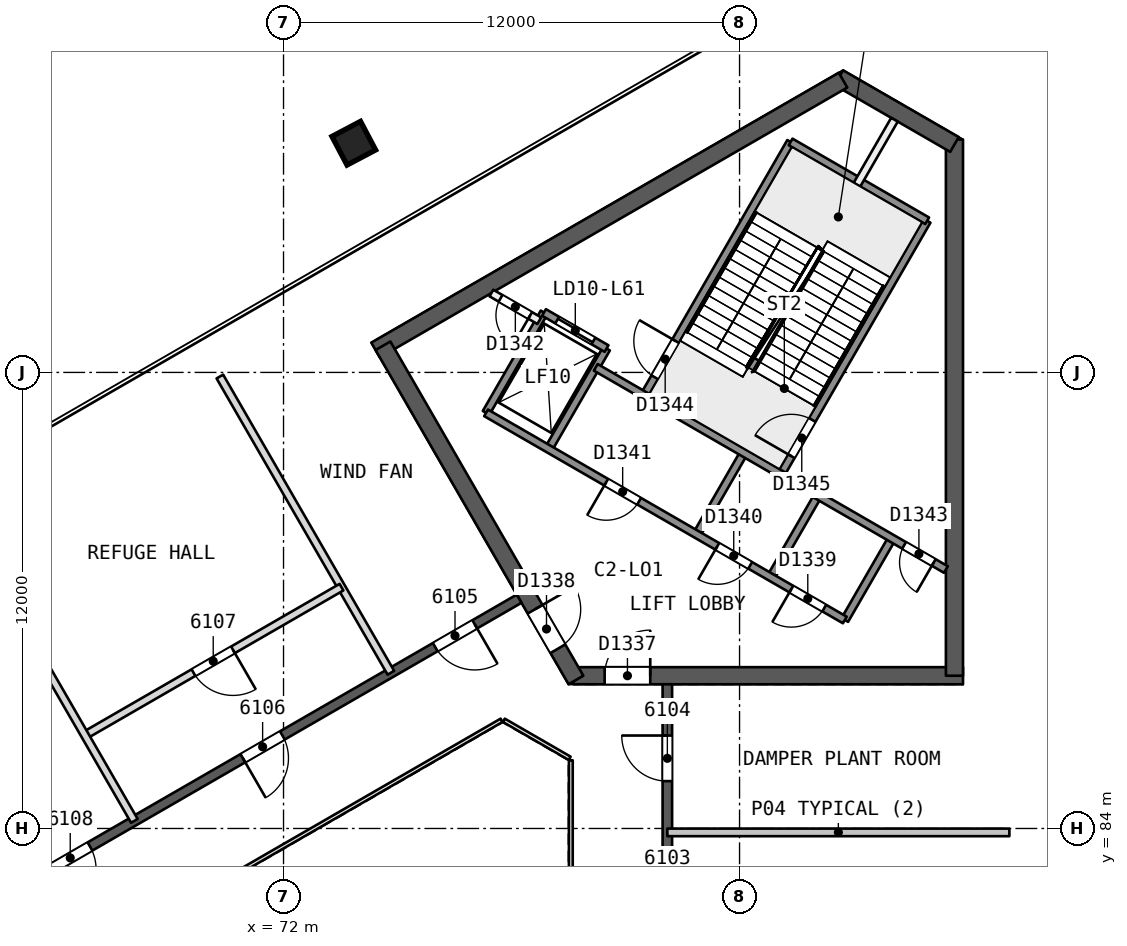
"""IFC4 building model, lengths in metres.
Left out: names, types, materials, properties, quantities, classifications, styles, units other than length and angle.
Written with IfcOpenShell. Run it as: python <this file> out.ifc"""

import sys

from ifc_helpers import new_model, si_unit, direction, frame, frame_2d, origin, origin_2d, place, context, subcontext, project, spatial, rectangle, extrude, element, fill, save


model = new_model("IFC4")
c1 = context("Model", 3, precision=1e-05, world=origin(), true_north=direction((0.0, 1.0)))
c2 = subcontext(c1, "Body", "Model", "MODEL_VIEW")
j1 = project(units=[si_unit("LENGTHUNIT", "METRE"), si_unit("PLANEANGLEUNIT", "RADIAN")], contexts=[c1])
p1 = place(None, origin())
s1 = spatial("IfcSite", under=j1, at=p1, CompositionType="ELEMENT")
p2 = place(p1, origin())
s2 = spatial("IfcBuilding", under=s1, at=p2, CompositionType="ELEMENT")
p3 = place(p2, frame((0.0, 0.0, 246.5)))
s3 = spatial("IfcBuildingStorey", under=s2, at=p3, CompositionType="ELEMENT", Elevation=246.5)
p4 = place(p3, frame((65.74, 80.0, 0.0), z_axis=(0.0, 0.0, 1.0), x_axis=(-0.499991857942, 0.866030104553, 0.0)))
e1 = element("IfcWall", 1, at=p4, inside=s3, PredefinedType="SHEAR", context=c2, shape_type="SweptSolid", body=[
    extrude(rectangle(XDim=10.25, YDim=0.45, at=frame_2d((5.125, 0.0))), origin(), (0.0, 0.0, 1.0), 8.8),
])
p5 = place(p4, frame((0.82, 0.0, 0.0)))
e2 = element("IfcOpeningElement", 2, at=p5, cuts=e1, PredefinedType="OPENING", context=c2, shape_type="SweptSolid", body=[
    extrude(rectangle(XDim=1.2, YDim=2.1, at=frame_2d((0.6, 1.05))), frame((0.0, 0.235, 0.0), z_axis=(0.0, -1.0, 0.0), x_axis=(1.0, 0.0, 0.0)), (0.0, 0.0, 1.0), 0.471),
])
p6 = place(p3, frame((79.63, 88.019, 0.0), z_axis=(0.0, 0.0, 1.0), x_axis=(1.0, 0.0, 0.0)))
e3 = element("IfcWall", 3, at=p6, inside=s3, PredefinedType="SHEAR", context=c2, shape_type="SweptSolid", body=[
    extrude(rectangle(XDim=10.25, YDim=0.45, at=frame_2d((5.125, 0.0))), origin(), (0.0, 0.0, 1.0), 8.8),
])
p7 = place(p6, frame((0.82, 0.0, 0.0)))
e4 = element("IfcOpeningElement", 4, at=p7, cuts=e3, PredefinedType="OPENING", context=c2, shape_type="SweptSolid", body=[
    extrude(rectangle(XDim=1.2, YDim=2.1, at=frame_2d((0.6, 1.05))), frame((0.0, 0.235, 0.0), z_axis=(0.0, -1.0, 0.0), x_axis=(1.0, 0.0, 0.0)), (0.0, 0.0, 1.0), 0.471),
])
p8 = place(p3, frame((89.655, 88.019, 0.0), z_axis=(0.0, 0.0, 1.0), x_axis=(0.0, 1.0, 0.0)))
e5 = element("IfcWall", 5, at=p8, inside=s3, PredefinedType="SHEAR", context=c2, shape_type="SweptSolid", body=[
    extrude(rectangle(XDim=14.108, YDim=0.45, at=frame_2d((7.054, 0.0))), origin(), (0.0, 0.0, 1.0), 8.8),
])
p9 = place(p3, frame((89.655, 101.998, 0.0), z_axis=(0.0, 0.0, 1.0), x_axis=(-0.866042179588, 0.49997094233, 0.0)))
e6 = element("IfcWall", 6, at=p9, inside=s3, PredefinedType="SHEAR", context=c2, shape_type="SweptSolid", body=[
    extrude(rectangle(XDim=3.515, YDim=0.45, at=frame_2d((1.758, 0.0))), origin(), (0.0, 0.0, 1.0), 8.8),
])
p10 = place(p3, frame((86.723, 103.69, 0.0), z_axis=(0.0, 0.0, 1.0), x_axis=(-0.866022713978, -0.500004658852, 0.0)))
e7 = element("IfcWall", 7, at=p10, inside=s3, PredefinedType="SHEAR", context=c2, shape_type="SweptSolid", body=[
    extrude(rectangle(XDim=14.203, YDim=0.45, at=frame_2d((7.102, 0.0))), origin(), (0.0, 0.0, 1.0), 8.8),
])
p11 = place(p3, frame((74.617, 96.701, 0.0), z_axis=(0.0, 0.0, 1.0), x_axis=(0.499994385119, -0.866028645513, 0.0)))
e8 = element("IfcWall", 8, at=p11, inside=s3, PredefinedType="SHEAR", context=c2, shape_type="SweptSolid", body=[
    extrude(rectangle(XDim=10.155, YDim=0.45, at=frame_2d((5.077, 0.0))), origin(), (0.0, 0.0, 1.0), 8.8),
])
p12 = place(p11, frame((8.005, 0.0, 0.0)))
e9 = element("IfcOpeningElement", 9, at=p12, cuts=e8, PredefinedType="OPENING", context=c2, shape_type="SweptSolid", body=[
    extrude(rectangle(XDim=1.2, YDim=2.1, at=frame_2d((0.6, 1.05))), frame((0.0, 0.235, 0.0), z_axis=(0.0, -1.0, 0.0), x_axis=(1.0, 0.0, 0.0)), (0.0, 0.0, 1.0), 0.471),
])
p13 = place(p3, frame((82.1, 72.206, 0.0), z_axis=(0.0, 0.0, 1.0), x_axis=(0.0, 1.0, 0.0)))
e10 = element("IfcWall", 10, at=p13, inside=s3, PredefinedType="SHEAR", context=c2, shape_type="SweptSolid", body=[
    extrude(rectangle(XDim=15.588, YDim=0.25, at=frame_2d((7.794, 0.0))), origin(), (0.0, 0.0, 1.0), 8.4),
])
p14 = place(p13, frame((3.297, 0.0, 0.0)))
e11 = element("IfcOpeningElement", 11, at=p14, cuts=e10, PredefinedType="OPENING", context=c2, shape_type="SweptSolid", body=[
    extrude(rectangle(XDim=1.2, YDim=2.4, at=frame_2d((0.6, 1.2))), frame((0.0, 0.135, 0.0), z_axis=(0.0, -1.0, 0.0), x_axis=(1.0, 0.0, 0.0)), (0.0, 0.0, 1.0), 0.271),
])
p15 = place(p13, frame((9.143, 0.0, 0.0)))
e12 = element("IfcOpeningElement", 12, at=p15, cuts=e10, PredefinedType="OPENING", context=c2, shape_type="SweptSolid", body=[
    extrude(rectangle(XDim=1.2, YDim=2.4, at=frame_2d((0.6, 1.2))), frame((0.0, 0.135, 0.0), z_axis=(0.0, -1.0, 0.0), x_axis=(1.0, 0.0, 0.0)), (0.0, 0.0, 1.0), 0.271),
])
p16 = place(p13, frame((13.04, 0.0, 0.0)))
e13 = element("IfcOpeningElement", 13, at=p16, cuts=e10, PredefinedType="OPENING", context=c2, shape_type="SweptSolid", body=[
    extrude(rectangle(XDim=1.2, YDim=2.4, at=frame_2d((0.6, 1.2))), frame((0.0, 0.135, 0.0), z_axis=(0.0, -1.0, 0.0), x_axis=(1.0, 0.0, 0.0)), (0.0, 0.0, 1.0), 0.271),
])
p17 = place(p3, frame((78.2, 90.046, 0.0), z_axis=(0.0, 0.0, 1.0), x_axis=(-0.866026492143, -0.499998114903, 0.0)))
e14 = element("IfcWall", 14, at=p17, inside=s3, PredefinedType="SHEAR", context=c2, shape_type="SweptSolid", body=[
    extrude(rectangle(XDim=15.588, YDim=0.25, at=frame_2d((7.794, 0.0))), origin(), (0.0, 0.0, 1.0), 8.4),
])
p18 = place(p17, frame((1.349, 0.0, 0.0)))
e15 = element("IfcOpeningElement", 15, at=p18, cuts=e14, PredefinedType="OPENING", context=c2, shape_type="SweptSolid", body=[
    extrude(rectangle(XDim=1.2, YDim=2.4, at=frame_2d((0.6, 1.2))), frame((0.0, 0.135, 0.0), z_axis=(0.0, -1.0, 0.0), x_axis=(1.0, 0.0, 0.0)), (0.0, 0.0, 1.0), 0.271),
])
p19 = place(p17, frame((7.194, 0.0, 0.0)))
e16 = element("IfcOpeningElement", 16, at=p19, cuts=e14, PredefinedType="OPENING", context=c2, shape_type="SweptSolid", body=[
    extrude(rectangle(XDim=1.2, YDim=2.4, at=frame_2d((0.6, 1.2))), frame((0.0, 0.135, 0.0), z_axis=(0.0, -1.0, 0.0), x_axis=(1.0, 0.0, 0.0)), (0.0, 0.0, 1.0), 0.271),
])
p20 = place(p17, frame((13.04, 0.0, 0.0)))
e17 = element("IfcOpeningElement", 17, at=p20, cuts=e14, PredefinedType="OPENING", context=c2, shape_type="SweptSolid", body=[
    extrude(rectangle(XDim=1.2, YDim=2.4, at=frame_2d((0.6, 1.2))), frame((0.0, 0.135, 0.0), z_axis=(0.0, -1.0, 0.0), x_axis=(1.0, 0.0, 0.0)), (0.0, 0.0, 1.0), 0.271),
])
p21 = place(p3, frame((73.848, 102.058, 0.0), z_axis=(0.0008598122, -0.022798891243, 0.999739701763), x_axis=(0.865987255057, 0.499952509757, 0.010656550371)))
e18 = element("IfcColumn", 18, at=p21, inside=s3, PredefinedType="COLUMN", context=c2, shape_type="SweptSolid", body=[
    extrude(rectangle(XDim=0.85, YDim=0.85, at=origin_2d()), origin(), (0.0, 0.0, 1.0), 8.802),
])
for number, where, z_axis, x_axis in (
    (19, (91.1, 83.897, 0.0), (0.0, 0.0, 1.0), (-1.0, 0.0, 0.0)),
    (20, (70.325, 95.892, 0.0), (0.0, 0.0, 1.0), (0.5, -0.866, 0.0)),
):
    element("IfcWall", number, at=place(p3, frame(where, z_axis=z_axis, x_axis=x_axis)), inside=s3, PredefinedType="PARTITIONING", context=c2, shape_type="SweptSolid", body=[
        extrude(rectangle(XDim=9.0, YDim=0.2, at=frame_2d((4.5, 0.0))), origin(), (0.0, 0.0, 1.0), 8.4),
    ])
p22 = place(p3, frame((73.525, 90.349, 0.0), z_axis=(0.0, 0.0, 1.0), x_axis=(-0.866019710441, -0.50000986103, 0.0)))
e21 = element("IfcWall", 21, at=p22, inside=s3, PredefinedType="PARTITIONING", context=c2, shape_type="SweptSolid", body=[
    extrude(rectangle(XDim=7.794, YDim=0.2, at=frame_2d((3.897, 0.0))), origin(), (0.0, 0.0, 1.0), 8.4),
])
p23 = place(p22, frame((3.297, 0.0, 0.0)))
e22 = element("IfcOpeningElement", 22, at=p23, cuts=e21, PredefinedType="OPENING", context=c2, shape_type="SweptSolid", body=[
    extrude(rectangle(XDim=1.2, YDim=2.4, at=frame_2d((0.6, 1.2))), frame((0.0, 0.11, 0.0), z_axis=(0.0, -1.0, 0.0), x_axis=(1.0, 0.0, 0.0)), (0.0, 0.0, 1.0), 0.221),
])
p24 = place(p3, frame((63.575, 91.994, 0.0), z_axis=(0.0, 0.0, 1.0), x_axis=(0.5000018851, -0.866024315419, 0.0)))
e23 = element("IfcWall", 23, at=p24, inside=s3, PredefinedType="PARTITIONING", context=c2, shape_type="SweptSolid", body=[
    extrude(rectangle(XDim=9.0, YDim=0.2, at=frame_2d((4.5, 0.0))), origin(), (0.0, 0.0, 1.0), 8.4),
])
for number, where, z_axis, x_axis in (
    (24, (86.77, 89.486, 0.0), (0.0, 0.0, 1.0), (0.5, 0.866, 0.0)),
    (25, (84.821, 90.611, 0.0), (0.0, 0.0, 1.0), (0.5, 0.866, 0.0)),
):
    element("IfcWall", number, at=place(p3, frame(where, z_axis=z_axis, x_axis=x_axis)), inside=s3, PredefinedType="SOLIDWALL", context=c2, shape_type="SweptSolid", body=[
        extrude(rectangle(XDim=2.48, YDim=0.2, at=frame_2d((1.24, 0.0))), origin(), (0.0, 0.0, 1.0), 8.4),
    ])
p25 = place(p3, frame((85.087, 93.321, 0.0), z_axis=(0.0, 0.0, 1.0), x_axis=(0.500019787375, 0.866013979237, 0.0)))
e26 = element("IfcWall", 26, at=p25, inside=s3, PredefinedType="SOLIDWALL", context=c2, shape_type="SweptSolid", body=[
    extrude(rectangle(XDim=7.7, YDim=0.2, at=frame_2d((3.85, 0.0))), origin(), (0.0, 0.0, 1.0), 8.4),
])
p26 = place(p25, frame((0.55, 0.0, 0.0)))
e27 = element("IfcOpeningElement", 27, at=p26, cuts=e26, PredefinedType="OPENING", context=c2, shape_type="SweptSolid", body=[
    extrude(rectangle(XDim=1.1, YDim=2.1, at=frame_2d((0.55, 1.05))), frame((0.0, 0.11, 0.0), z_axis=(0.0, -1.0, 0.0), x_axis=(1.0, 0.0, 0.0)), (0.0, 0.0, 1.0), 0.221),
])
p27 = place(p3, frame((82.873, 91.736, 0.0), z_axis=(0.0, 0.0, 1.0), x_axis=(0.499961042966, 0.86604789447, 0.0)))
e28 = element("IfcWall", 28, at=p27, inside=s3, PredefinedType="SOLIDWALL", context=c2, shape_type="SweptSolid", body=[
    extrude(rectangle(XDim=2.48, YDim=0.2, at=frame_2d((1.24, 0.0))), origin(), (0.0, 0.0, 1.0), 8.4),
])
p28 = place(p3, frame((83.34, 94.445, 0.0), z_axis=(0.0, 0.0, 1.0), x_axis=(0.499946605688, 0.86605622881, 0.0)))
e29 = element("IfcWall", 29, at=p28, inside=s3, PredefinedType="SOLIDWALL", context=c2, shape_type="SweptSolid", body=[
    extrude(rectangle(XDim=2.2, YDim=0.2, at=frame_2d((1.1, 0.0))), origin(), (0.0, 0.0, 1.0), 8.4),
])
p29 = place(p3, frame((87.09, 100.94, 0.0), z_axis=(0.0, 0.0, 1.0), x_axis=(0.500011643316, 0.866018681408, 0.0)))
e30 = element("IfcWall", 30, at=p29, inside=s3, PredefinedType="PARTITIONING", context=c2, shape_type="SweptSolid", body=[
    extrude(rectangle(XDim=1.973, YDim=0.2, at=frame_2d((0.987, 0.0))), origin(), (0.0, 0.0, 1.0), 8.4),
])
p30 = place(p3, frame((81.493, 95.396, 0.0), z_axis=(0.0, 0.0, 1.0), x_axis=(0.500006057782, 0.866021906294, 0.0)))
e31 = element("IfcWall", 31, at=p30, inside=s3, PredefinedType="SOLIDWALL", context=c2, shape_type="SweptSolid", body=[
    extrude(rectangle(XDim=7.7, YDim=0.2, at=frame_2d((3.85, 0.0))), origin(), (0.0, 0.0, 1.0), 8.4),
])
p31 = place(p30, frame((0.55, 0.0, 0.0)))
e32 = element("IfcOpeningElement", 32, at=p31, cuts=e31, PredefinedType="OPENING", context=c2, shape_type="SweptSolid", body=[
    extrude(rectangle(XDim=1.1, YDim=2.1, at=frame_2d((0.55, 1.05))), frame((0.0, 0.11, 0.0), z_axis=(0.0, -1.0, 0.0), x_axis=(1.0, 0.0, 0.0)), (0.0, 0.0, 1.0), 0.221),
])
for number, where, z_axis, x_axis in (
    (33, (78.976, 93.986, 0.0), (0.0, 0.0, 1.0), (0.5, 0.866, 0.0)),
    (34, (77.33, 94.936, 0.0), (0.0, 0.0, 1.0), (0.5, 0.866, 0.0)),
):
    element("IfcWall", number, at=place(p3, frame(where, z_axis=z_axis, x_axis=x_axis)), inside=s3, PredefinedType="SOLIDWALL", context=c2, shape_type="SweptSolid", body=[
        extrude(rectangle(XDim=3.05, YDim=0.2, at=frame_2d((1.525, 0.0))), origin(), (0.0, 0.0, 1.0), 8.4),
    ])
p32 = place(p3, frame((86.77, 89.486, 0.0), z_axis=(0.0, 0.0, 1.0), x_axis=(-0.86601811187, 0.500012629753, 0.0)))
e35 = element("IfcWall", 35, at=p32, inside=s3, PredefinedType="SOLIDWALL", context=c2, shape_type="SweptSolid", body=[
    extrude(rectangle(XDim=10.9, YDim=0.2, at=frame_2d((5.45, 0.0))), origin(), (0.0, 0.0, 1.0), 8.4),
])
p33 = place(p32, frame((0.625, 0.0, 0.0)))
e36 = element("IfcOpeningElement", 36, at=p33, cuts=e35, PredefinedType="OPENING", context=c2, shape_type="SweptSolid", body=[
    extrude(rectangle(XDim=1.0, YDim=2.1, at=frame_2d((0.5, 1.05))), frame((0.0, 0.11, 0.0), z_axis=(0.0, -1.0, 0.0), x_axis=(1.0, 0.0, 0.0)), (0.0, 0.0, 1.0), 0.221),
])
p34 = place(p32, frame((2.875, 0.0, 0.0)))
e37 = element("IfcOpeningElement", 37, at=p34, cuts=e35, PredefinedType="OPENING", context=c2, shape_type="SweptSolid", body=[
    extrude(rectangle(XDim=1.0, YDim=2.1, at=frame_2d((0.5, 1.05))), frame((0.0, 0.11, 0.0), z_axis=(0.0, -1.0, 0.0), x_axis=(1.0, 0.0, 0.0)), (0.0, 0.0, 1.0), 0.221),
])
p35 = place(p32, frame((6.25, 0.0, 0.0)))
e38 = element("IfcOpeningElement", 38, at=p35, cuts=e35, PredefinedType="OPENING", context=c2, shape_type="SweptSolid", body=[
    extrude(rectangle(XDim=1.0, YDim=2.1, at=frame_2d((0.5, 1.05))), frame((0.0, 0.11, 0.0), z_axis=(0.0, -1.0, 0.0), x_axis=(1.0, 0.0, 0.0)), (0.0, 0.0, 1.0), 0.221),
])
p36 = place(p3, frame((89.43, 90.814, 0.0), z_axis=(0.0, 0.0, 1.0), x_axis=(-0.866018983788, 0.500011119594, 0.0)))
e39 = element("IfcWall", 39, at=p36, inside=s3, PredefinedType="SOLIDWALL", context=c2, shape_type="SweptSolid", body=[
    extrude(rectangle(XDim=10.64, YDim=0.2, at=frame_2d((5.32, 0.0))), origin(), (0.0, 0.0, 1.0), 8.4),
])
p37 = place(p36, frame((0.37, 0.0, 0.0)))
e40 = element("IfcOpeningElement", 40, at=p37, cuts=e39, PredefinedType="OPENING", context=c2, shape_type="SweptSolid", body=[
    extrude(rectangle(XDim=0.9, YDim=2.1, at=frame_2d((0.45, 1.05))), frame((0.0, 0.11, 0.0), z_axis=(0.0, -1.0, 0.0), x_axis=(1.0, 0.0, 0.0)), (0.0, 0.0, 1.0), 0.221),
])
p38 = place(p3, frame((78.73, 97.361, 0.0), z_axis=(0.0, 0.0, 1.0), x_axis=(-0.866045896294, 0.499964504253, 0.0)))
e41 = element("IfcWall", 41, at=p38, inside=s3, PredefinedType="PARTITIONING", context=c2, shape_type="SweptSolid", body=[
    extrude(rectangle(XDim=1.455, YDim=0.2, at=frame_2d((0.728, 0.0))), origin(), (0.0, 0.0, 1.0), 8.4),
])
p39 = place(p38, frame((0.278, 0.0, 0.0)))
e42 = element("IfcOpeningElement", 42, at=p39, cuts=e41, PredefinedType="OPENING", context=c2, shape_type="SweptSolid", body=[
    extrude(rectangle(XDim=0.9, YDim=2.1, at=frame_2d((0.45, 1.05))), frame((0.0, 0.11, 0.0), z_axis=(0.0, -1.0, 0.0), x_axis=(1.0, 0.0, 0.0)), (0.0, 0.0, 1.0), 0.221),
])
p40 = place(p3, frame((80.5, 96.627, 0.0), z_axis=(0.0, 0.0, 1.0), x_axis=(-0.86601224135, 0.500022797313, 0.0)))
e43 = element("IfcWall", 43, at=p40, inside=s3, PredefinedType="SOLIDWALL", context=c2, shape_type="SweptSolid", body=[
    extrude(rectangle(XDim=1.9, YDim=0.2, at=frame_2d((0.95, 0.0))), origin(), (0.0, 0.0, 1.0), 8.4),
])
p41 = place(p40, frame((0.4, 0.0, 0.0)))
e44 = element("IfcOpeningElement", 44, at=p41, cuts=e43, PredefinedType="OPENING", context=c2, shape_type="SweptSolid", body=[
    extrude(rectangle(XDim=1.1, YDim=2.1, at=frame_2d((0.55, 1.05))), frame((0.0, 0.11, 0.0), z_axis=(0.0, -1.0, 0.0), x_axis=(1.0, 0.0, 0.0)), (0.0, 0.0, 1.0), 0.221),
])
p42 = place(p3, frame((88.937, 99.99, 0.0), z_axis=(0.0, 0.0, 1.0), x_axis=(-0.866004344652, 0.500036473714, 0.0)))
e45 = element("IfcWall", 45, at=p42, inside=s3, PredefinedType="SOLIDWALL", context=c2, shape_type="SweptSolid", body=[
    extrude(rectangle(XDim=4.15, YDim=0.2, at=frame_2d((2.075, 0.0))), origin(), (0.0, 0.0, 1.0), 8.4),
])
p43 = place(p3, frame((79.56, 74.206, 0.0), z_axis=(0.0, 0.0, 1.0), x_axis=(0.0, 1.0, 0.0)))
e46 = element("IfcWall", 46, at=p43, inside=s3, PredefinedType="PARTITIONING", context=c2, shape_type="SweptSolid", body=[
    extrude(rectangle(XDim=11.588, YDim=0.1, at=frame_2d((5.794, 0.0))), origin(), (0.0, 0.0, 1.0), 8.4),
])
p44 = place(p3, frame((79.53, 85.846, 0.0), z_axis=(0.0, 0.0, 1.0), x_axis=(-0.866041268327, 0.499972520799, 0.0)))
e47 = element("IfcWall", 47, at=p44, inside=s3, PredefinedType="PARTITIONING", context=c2, shape_type="SweptSolid", body=[
    extrude(rectangle(XDim=2.0, YDim=0.1, at=frame_2d((1.0, 0.0))), origin(), (0.0, 0.0, 1.0), 8.4),
])
p45 = place(p3, frame((77.738, 86.846, 0.0), z_axis=(0.0, 0.0, 1.0), x_axis=(-0.866026658274, -0.499997827154, 0.0)))
e48 = element("IfcWall", 48, at=p45, inside=s3, PredefinedType="PARTITIONING", context=c2, shape_type="SweptSolid", body=[
    extrude(rectangle(XDim=11.588, YDim=0.1, at=frame_2d((5.794, 0.0))), origin(), (0.0, 0.0, 1.0), 8.4),
])
p46 = place(p16, origin())
e49 = element("IfcDoor", 49, at=p46, inside=s3, OperationType="SINGLE_SWING_RIGHT", PredefinedType="NOTDEFINED", context=c2, shape_type="SweptSolid", body=[
    extrude(rectangle(XDim=1.2, YDim=2.4, at=frame_2d((0.6, 1.2))), frame((0.0, 0.025, 0.0), z_axis=(0.0, -1.0, 0.0), x_axis=(1.0, 0.0, 0.0)), (0.0, 0.0, 1.0), 0.05),
])
fill(e13, e49)
p47 = place(p18, origin())
e50 = element("IfcDoor", 50, at=p47, inside=s3, OperationType="SINGLE_SWING_LEFT", PredefinedType="NOTDEFINED", context=c2, shape_type="SweptSolid", body=[
    extrude(rectangle(XDim=1.2, YDim=2.4, at=frame_2d((0.6, 1.2))), frame((0.0, 0.025, 0.0), z_axis=(0.0, -1.0, 0.0), x_axis=(1.0, 0.0, 0.0)), (0.0, 0.0, 1.0), 0.05),
])
fill(e15, e50)
p48 = place(p19, origin())
e51 = element("IfcDoor", 51, at=p48, inside=s3, OperationType="SINGLE_SWING_RIGHT", PredefinedType="NOTDEFINED", context=c2, shape_type="SweptSolid", body=[
    extrude(rectangle(XDim=1.2, YDim=2.4, at=frame_2d((0.6, 1.2))), frame((0.0, 0.025, 0.0), z_axis=(0.0, -1.0, 0.0), x_axis=(1.0, 0.0, 0.0)), (0.0, 0.0, 1.0), 0.05),
])
fill(e16, e51)
p49 = place(p23, origin())
e52 = element("IfcDoor", 52, at=p49, inside=s3, OperationType="SINGLE_SWING_LEFT", PredefinedType="NOTDEFINED", context=c2, shape_type="SweptSolid", body=[
    extrude(rectangle(XDim=1.2, YDim=2.4, at=frame_2d((0.6, 1.2))), frame((0.0, 0.025, 0.0), z_axis=(0.0, -1.0, 0.0), x_axis=(1.0, 0.0, 0.0)), (0.0, 0.0, 1.0), 0.05),
])
fill(e22, e52)
p50 = place(p20, origin())
e53 = element("IfcDoor", 53, at=p50, inside=s3, OperationType="SINGLE_SWING_RIGHT", PredefinedType="NOTDEFINED", context=c2, shape_type="SweptSolid", body=[
    extrude(rectangle(XDim=1.2, YDim=2.4, at=frame_2d((0.6, 1.2))), frame((0.0, 0.025, 0.0), z_axis=(0.0, -1.0, 0.0), x_axis=(1.0, 0.0, 0.0)), (0.0, 0.0, 1.0), 0.05),
])
fill(e17, e53)
p51 = place(p7, origin())
e54 = element("IfcDoor", 54, at=p51, inside=s3, OperationType="SINGLE_SWING_RIGHT", PredefinedType="NOTDEFINED", context=c2, shape_type="SweptSolid", body=[
    extrude(rectangle(XDim=1.2, YDim=2.1, at=frame_2d((0.6, 1.05))), frame((0.0, 0.025, 0.0), z_axis=(0.0, -1.0, 0.0), x_axis=(1.0, 0.0, 0.0)), (0.0, 0.0, 1.0), 0.05),
])
fill(e4, e54)
p52 = place(p12, origin())
e55 = element("IfcDoor", 55, at=p52, inside=s3, OperationType="SINGLE_SWING_LEFT", PredefinedType="NOTDEFINED", context=c2, shape_type="SweptSolid", body=[
    extrude(rectangle(XDim=1.2, YDim=2.1, at=frame_2d((0.6, 1.05))), frame((0.0, 0.025, 0.0), z_axis=(0.0, -1.0, 0.0), x_axis=(1.0, 0.0, 0.0)), (0.0, 0.0, 1.0), 0.05),
])
fill(e9, e55)
p53 = place(p41, origin())
e56 = element("IfcDoor", 56, at=p53, inside=s3, OperationType="SLIDING_TO_RIGHT", PredefinedType="NOTDEFINED", context=c2, shape_type="SweptSolid", body=[
    extrude(rectangle(XDim=1.1, YDim=2.1, at=frame_2d((0.55, 1.05))), frame((0.0, 0.025, 0.0), z_axis=(0.0, -1.0, 0.0), x_axis=(1.0, 0.0, 0.0)), (0.0, 0.0, 1.0), 0.05),
])
fill(e44, e56)
p54 = place(p33, origin())
e57 = element("IfcDoor", 57, at=p54, inside=s3, OperationType="SINGLE_SWING_RIGHT", PredefinedType="NOTDEFINED", context=c2, shape_type="SweptSolid", body=[
    extrude(rectangle(XDim=1.0, YDim=2.1, at=frame_2d((0.5, 1.05))), frame((0.0, 0.025, 0.0), z_axis=(0.0, -1.0, 0.0), x_axis=(1.0, 0.0, 0.0)), (0.0, 0.0, 1.0), 0.05),
])
fill(e36, e57)
p55 = place(p34, origin())
e58 = element("IfcDoor", 58, at=p55, inside=s3, OperationType="SINGLE_SWING_RIGHT", PredefinedType="NOTDEFINED", context=c2, shape_type="SweptSolid", body=[
    extrude(rectangle(XDim=1.0, YDim=2.1, at=frame_2d((0.5, 1.05))), frame((0.0, 0.025, 0.0), z_axis=(0.0, -1.0, 0.0), x_axis=(1.0, 0.0, 0.0)), (0.0, 0.0, 1.0), 0.05),
])
fill(e37, e58)
p56 = place(p35, origin())
e59 = element("IfcDoor", 59, at=p56, inside=s3, OperationType="SINGLE_SWING_RIGHT", PredefinedType="NOTDEFINED", context=c2, shape_type="SweptSolid", body=[
    extrude(rectangle(XDim=1.0, YDim=2.1, at=frame_2d((0.5, 1.05))), frame((0.0, 0.025, 0.0), z_axis=(0.0, -1.0, 0.0), x_axis=(1.0, 0.0, 0.0)), (0.0, 0.0, 1.0), 0.05),
])
fill(e38, e59)
p57 = place(p39, origin())
e60 = element("IfcDoor", 60, at=p57, inside=s3, OperationType="SINGLE_SWING_LEFT", PredefinedType="NOTDEFINED", context=c2, shape_type="SweptSolid", body=[
    extrude(rectangle(XDim=0.9, YDim=2.1, at=frame_2d((0.45, 1.05))), frame((0.0, 0.025, 0.0), z_axis=(0.0, -1.0, 0.0), x_axis=(1.0, 0.0, 0.0)), (0.0, 0.0, 1.0), 0.05),
])
fill(e42, e60)
p58 = place(p37, origin())
e61 = element("IfcDoor", 61, at=p58, inside=s3, OperationType="SINGLE_SWING_LEFT", PredefinedType="NOTDEFINED", context=c2, shape_type="SweptSolid", body=[
    extrude(rectangle(XDim=0.9, YDim=2.1, at=frame_2d((0.45, 1.05))), frame((0.0, 0.025, 0.0), z_axis=(0.0, -1.0, 0.0), x_axis=(1.0, 0.0, 0.0)), (0.0, 0.0, 1.0), 0.05),
])
fill(e40, e61)
p59 = place(p31, origin())
e62 = element("IfcDoor", 62, at=p59, inside=s3, OperationType="SINGLE_SWING_RIGHT", PredefinedType="NOTDEFINED", context=c2, shape_type="SweptSolid", body=[
    extrude(rectangle(XDim=1.1, YDim=2.1, at=frame_2d((0.55, 1.05))), frame((0.0, 0.025, 0.0), z_axis=(0.0, -1.0, 0.0), x_axis=(1.0, 0.0, 0.0)), (0.0, 0.0, 1.0), 0.05),
])
fill(e32, e62)
p60 = place(p26, origin())
e63 = element("IfcDoor", 63, at=p60, inside=s3, OperationType="SINGLE_SWING_LEFT", PredefinedType="NOTDEFINED", context=c2, shape_type="SweptSolid", body=[
    extrude(rectangle(XDim=1.1, YDim=2.1, at=frame_2d((0.55, 1.05))), frame((0.0, 0.025, 0.0), z_axis=(0.0, -1.0, 0.0), x_axis=(1.0, 0.0, 0.0)), (0.0, 0.0, 1.0), 0.05),
])
fill(e27, e63)
save(model, sys.argv[1])
